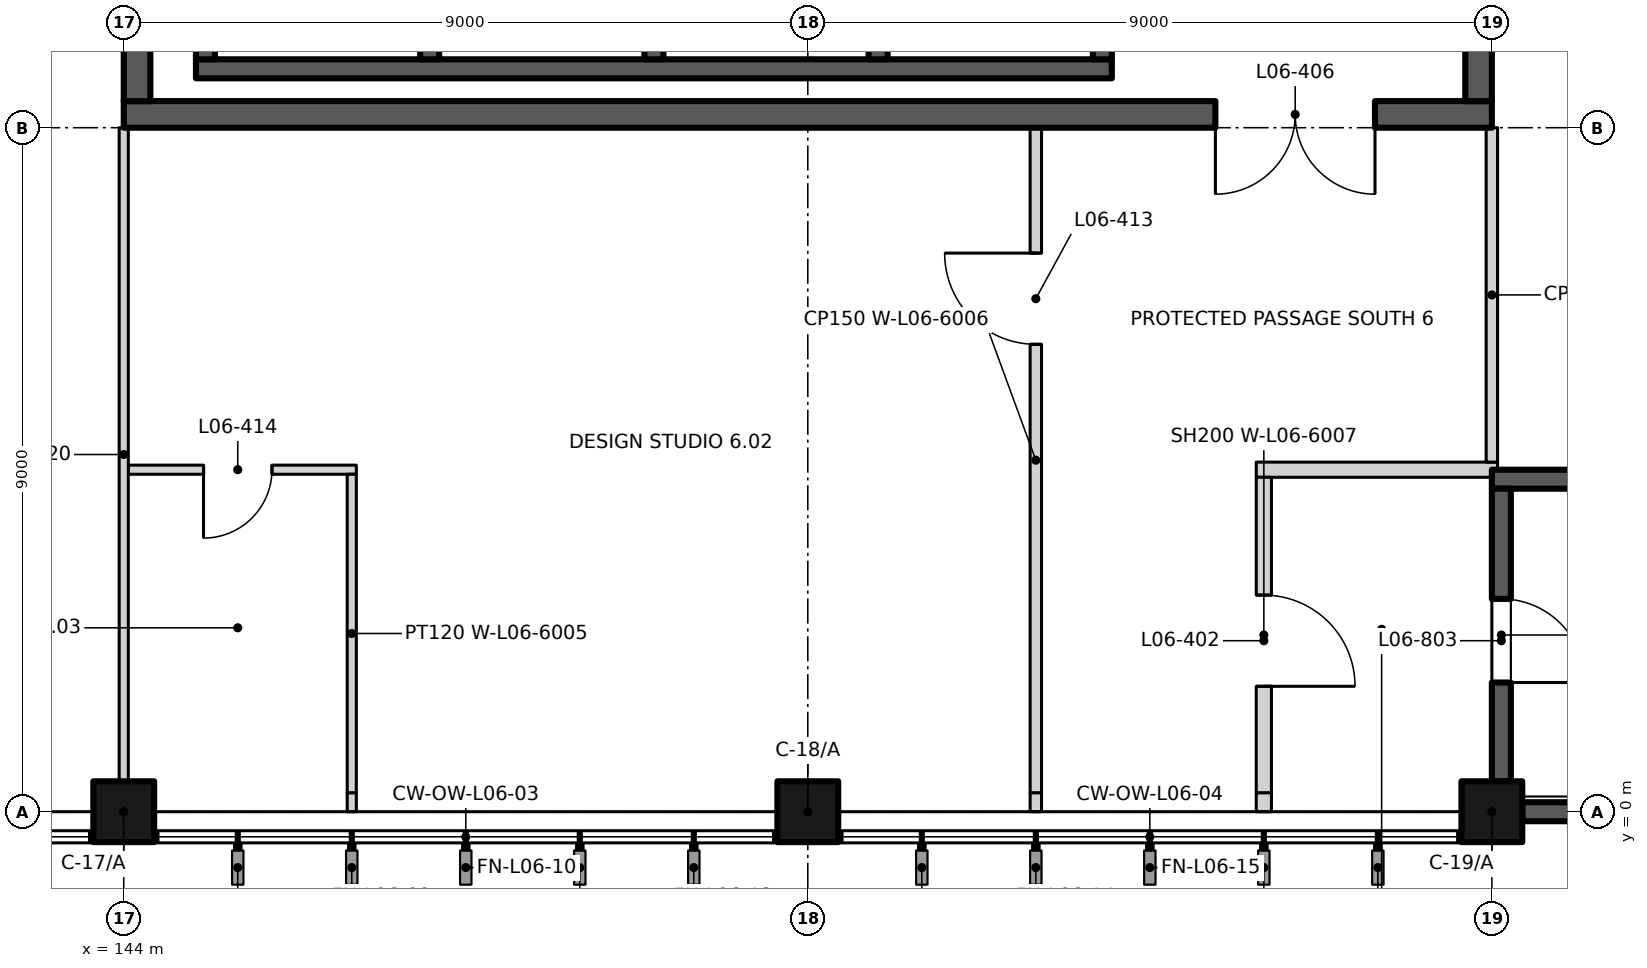
"""IFC4 building model, lengths in metres.
Left out: names, types, materials, properties, quantities, classifications, styles, units other than length and angle.
Written with IfcOpenShell. Run it as: python <this file> out.ifc"""

import sys

from ifc_helpers import new_model, si_unit, direction, frame, frame_2d, origin, origin_2d, place, context, subcontext, project, spatial, rectangle, extrude, element, fill, save


model = new_model("IFC4")
c1 = context("Model", 3, precision=1e-05, world=origin(), true_north=direction((0.0, 1.0)))
c2 = subcontext(c1, "Body", "Model", "MODEL_VIEW")
j1 = project(units=[si_unit("LENGTHUNIT", "METRE"), si_unit("PLANEANGLEUNIT", "RADIAN")], contexts=[c1])
p1 = place(None, origin())
s1 = spatial("IfcSite", under=j1, at=p1, CompositionType="ELEMENT")
p2 = place(p1, origin())
s2 = spatial("IfcBuilding", under=s1, at=p2, CompositionType="ELEMENT")
p3 = place(p2, frame((0.0, 0.0, 28.5)))
s3 = spatial("IfcBuildingStorey", under=s2, at=p3, CompositionType="ELEMENT", Elevation=28.5)
for number, where, z_axis, x_axis in (
    (1, (144.0, 0.0, 0.0), (0.0, 0.0, 1.0), (1.0, 0.0, 0.0)),
    (2, (153.0, 0.0, 0.0), (0.0, 0.0, 1.0), (1.0, 0.0, 0.0)),
    (3, (162.0, 0.0, 0.0), (0.0, 0.0, 1.0), (1.0, 0.0, 0.0)),
):
    element("IfcColumn", number, at=place(p3, frame(where, z_axis=z_axis, x_axis=x_axis)), inside=s3, PredefinedType="COLUMN", context=c2, shape_type="SweptSolid", body=[
        extrude(rectangle(XDim=0.8, YDim=0.8, at=origin_2d()), origin(), (0.0, 0.0, 1.0), 4.5),
    ])
p4 = place(p3, frame((162.4, 0.0, 0.0), z_axis=(0.0, 0.0, 1.0), x_axis=(1.0, 0.0, 0.0)))
e4 = element("IfcWall", 4, at=p4, inside=s3, PredefinedType="SHEAR", context=c2, shape_type="SweptSolid", body=[
    extrude(rectangle(XDim=8.2, YDim=0.25, at=frame_2d((4.1, 0.0))), origin(), (0.0, 0.0, 1.0), 4.5),
])
p5 = place(p3, frame((162.0, 4.375, 0.0), z_axis=(0.0, 0.0, 1.0), x_axis=(1.0, 0.0, 0.0)))
e5 = element("IfcWall", 5, at=p5, inside=s3, PredefinedType="SHEAR", context=c2, shape_type="SweptSolid", body=[
    extrude(rectangle(XDim=9.0, YDim=0.25, at=frame_2d((4.5, 0.0))), origin(), (0.0, 0.0, 1.0), 4.5),
])
p6 = place(p3, frame((162.125, 0.4, 0.0), z_axis=(0.0, 0.0, 1.0), x_axis=(0.0, 1.0, 0.0)))
e6 = element("IfcWall", 6, at=p6, inside=s3, PredefinedType="SHEAR", context=c2, shape_type="SweptSolid", body=[
    extrude(rectangle(XDim=3.85, YDim=0.25, at=frame_2d((1.925, 0.0))), origin(), (0.0, 0.0, 1.0), 4.5),
])
p7 = place(p6, frame((2.4, 0.0, 0.0), z_axis=(0.0, 0.0, 1.0), x_axis=(-1.0, 0.0, 0.0)))
e7 = element("IfcOpeningElement", 7, at=p7, cuts=e6, PredefinedType="OPENING", context=c2, shape_type="SweptSolid", body=[
    extrude(rectangle(XDim=1.1, YDim=2.1, at=frame_2d((0.55, 1.05))), frame((0.0, 0.135, 0.0), z_axis=(0.0, -1.0, 0.0), x_axis=(1.0, 0.0, 0.0)), (0.0, 0.0, 1.0), 0.27),
])
p8 = place(p3, frame((144.95, 9.775, 0.0), z_axis=(0.0, 0.0, 1.0), x_axis=(1.0, 0.0, 0.0)))
e8 = element("IfcWall", 8, at=p8, inside=s3, PredefinedType="SHEAR", context=c2, shape_type="SweptSolid", body=[
    extrude(rectangle(XDim=12.05, YDim=0.25, at=frame_2d((6.025, 0.0))), origin(), (0.0, 0.0, 1.0), 4.5),
])
for number, where, z_axis, x_axis in (
    (9, (145.075, 9.9, 0.0), (0.0, 0.0, 1.0), (0.0, 1.0, 0.0)),
    (10, (148.025, 9.9, 0.0), (0.0, 0.0, 1.0), (0.0, 1.0, 0.0)),
    (11, (150.975, 9.9, 0.0), (0.0, 0.0, 1.0), (0.0, 1.0, 0.0)),
    (12, (153.925, 9.9, 0.0), (0.0, 0.0, 1.0), (0.0, 1.0, 0.0)),
    (13, (156.875, 9.9, 0.0), (0.0, 0.0, 1.0), (0.0, 1.0, 0.0)),
):
    element("IfcWall", number, at=place(p3, frame(where, z_axis=z_axis, x_axis=x_axis)), inside=s3, PredefinedType="SHEAR", context=c2, shape_type="SweptSolid", body=[
        extrude(rectangle(XDim=2.7, YDim=0.25, at=frame_2d((1.35, 0.0))), origin(), (0.0, 0.0, 1.0), 4.5),
    ])
p9 = place(p3, frame((144.06, 4.5, 0.0), z_axis=(0.0, 0.0, 1.0), x_axis=(1.0, 0.0, 0.0)))
e14 = element("IfcWall", 14, at=p9, inside=s3, PredefinedType="PARTITIONING", context=c2, shape_type="SweptSolid", body=[
    extrude(rectangle(XDim=3.0, YDim=0.12, at=frame_2d((1.5, 0.0))), origin(), (0.0, 0.0, 1.0), 4.2),
])
p10 = place(p9, frame((1.89, 0.0, 0.0), z_axis=(0.0, 0.0, 1.0), x_axis=(-1.0, 0.0, 0.0)))
e15 = element("IfcOpeningElement", 15, at=p10, cuts=e14, PredefinedType="OPENING", context=c2, shape_type="SweptSolid", body=[
    extrude(rectangle(XDim=0.9, YDim=2.1, at=frame_2d((0.45, 1.05))), frame((0.0, 0.07, 0.0), z_axis=(0.0, -1.0, 0.0), x_axis=(1.0, 0.0, 0.0)), (0.0, 0.0, 1.0), 0.14),
])
p11 = place(p3, frame((158.9, 4.5, 0.0), z_axis=(0.0, 0.0, 1.0), x_axis=(1.0, 0.0, 0.0)))
e16 = element("IfcWall", 16, at=p11, inside=s3, PredefinedType="PARTITIONING", context=c2, shape_type="SweptSolid", body=[
    extrude(rectangle(XDim=3.175, YDim=0.2, at=frame_2d((1.587, 0.0))), origin(), (0.0, 0.0, 1.0), 4.2),
])
p12 = place(p3, frame((144.0, 9.175, 0.0), z_axis=(0.0, 0.0, 1.0), x_axis=(1.0, 0.0, 0.0)))
e17 = element("IfcWall", 17, at=p12, inside=s3, PredefinedType="SHEAR", context=c2, shape_type="SweptSolid", body=[
    extrude(rectangle(XDim=18.0, YDim=0.35, at=frame_2d((9.0, 0.0))), origin(), (0.0, 0.0, 1.0), 4.2),
])
p13 = place(p12, frame((16.463, 0.0, 0.0), z_axis=(0.0, 0.0, 1.0), x_axis=(-1.0, 0.0, 0.0)))
e18 = element("IfcOpeningElement", 18, at=p13, cuts=e17, PredefinedType="OPENING", context=c2, shape_type="SweptSolid", body=[
    extrude(rectangle(XDim=2.1, YDim=2.4, at=frame_2d((1.05, 1.2))), frame((0.0, 0.185, 0.0), z_axis=(0.0, -1.0, 0.0), x_axis=(1.0, 0.0, 0.0)), (0.0, 0.0, 1.0), 0.37),
])
p14 = place(p3, frame((144.0, 0.4, 0.0), z_axis=(0.0, 0.0, 1.0), x_axis=(0.0, 1.0, 0.0)))
e19 = element("IfcWall", 19, at=p14, inside=s3, PredefinedType="PARTITIONING", context=c2, shape_type="SweptSolid", body=[
    extrude(rectangle(XDim=8.6, YDim=0.12, at=frame_2d((4.3, 0.0))), origin(), (0.0, 0.0, 1.0), 4.2),
])
p15 = place(p3, frame((144.175, 9.35, 0.0), z_axis=(0.0, 0.0, 1.0), x_axis=(0.0, 1.0, 0.0)))
e20 = element("IfcWall", 20, at=p15, inside=s3, PredefinedType="SHEAR", context=c2, shape_type="SweptSolid", body=[
    extrude(rectangle(XDim=17.4, YDim=0.35, at=frame_2d((8.7, 0.0))), origin(), (0.0, 0.0, 1.0), 4.2),
])
p16 = place(p15, frame((3.75, 0.0, 0.0)))
e21 = element("IfcOpeningElement", 21, at=p16, cuts=e20, PredefinedType="OPENING", context=c2, shape_type="SweptSolid", body=[
    extrude(rectangle(XDim=1.6, YDim=2.4, at=frame_2d((0.8, 1.2))), frame((0.0, 0.185, 0.0), z_axis=(0.0, -1.0, 0.0), x_axis=(1.0, 0.0, 0.0)), (0.0, 0.0, 1.0), 0.37),
])
p17 = place(p3, frame((147.0, 0.0, 0.0), z_axis=(0.0, 0.0, 1.0), x_axis=(0.0, 1.0, 0.0)))
e22 = element("IfcWall", 22, at=p17, inside=s3, PredefinedType="PARTITIONING", context=c2, shape_type="SweptSolid", body=[
    extrude(rectangle(XDim=0.25, YDim=0.12, at=frame_2d((0.125, 0.0))), origin(), (0.0, 0.0, 1.0), 3.6),
])
p18 = place(p3, frame((147.0, 0.25, 0.0), z_axis=(0.0, 0.0, 1.0), x_axis=(0.0, 1.0, 0.0)))
e23 = element("IfcWall", 23, at=p18, inside=s3, PredefinedType="PARTITIONING", context=c2, shape_type="SweptSolid", body=[
    extrude(rectangle(XDim=4.19, YDim=0.12, at=frame_2d((2.095, 0.0))), origin(), (0.0, 0.0, 1.0), 4.2),
])
p19 = place(p3, frame((156.0, 0.0, 0.0), z_axis=(0.0, 0.0, 1.0), x_axis=(0.0, 1.0, 0.0)))
e24 = element("IfcWall", 24, at=p19, inside=s3, PredefinedType="PARTITIONING", context=c2, shape_type="SweptSolid", body=[
    extrude(rectangle(XDim=0.25, YDim=0.15, at=frame_2d((0.125, 0.0))), origin(), (0.0, 0.0, 1.0), 3.6),
])
p20 = place(p3, frame((156.0, 0.25, 0.0), z_axis=(0.0, 0.0, 1.0), x_axis=(0.0, 1.0, 0.0)))
e25 = element("IfcWall", 25, at=p20, inside=s3, PredefinedType="PARTITIONING", context=c2, shape_type="SweptSolid", body=[
    extrude(rectangle(XDim=8.75, YDim=0.15, at=frame_2d((4.375, 0.0))), origin(), (0.0, 0.0, 1.0), 4.2),
])
p21 = place(p20, frame((5.9, 0.0, 0.0)))
e26 = element("IfcOpeningElement", 26, at=p21, cuts=e25, PredefinedType="OPENING", context=c2, shape_type="SweptSolid", body=[
    extrude(rectangle(XDim=1.2, YDim=2.1, at=frame_2d((0.6, 1.05))), frame((0.0, 0.085, 0.0), z_axis=(0.0, -1.0, 0.0), x_axis=(1.0, 0.0, 0.0)), (0.0, 0.0, 1.0), 0.17),
])
p22 = place(p3, frame((159.0, 0.0, 0.0), z_axis=(0.0, 0.0, 1.0), x_axis=(0.0, 1.0, 0.0)))
e27 = element("IfcWall", 27, at=p22, inside=s3, PredefinedType="PARTITIONING", context=c2, shape_type="SweptSolid", body=[
    extrude(rectangle(XDim=0.25, YDim=0.2, at=frame_2d((0.125, 0.0))), origin(), (0.0, 0.0, 1.0), 3.6),
])
p23 = place(p3, frame((159.0, 0.25, 0.0), z_axis=(0.0, 0.0, 1.0), x_axis=(0.0, 1.0, 0.0)))
e28 = element("IfcWall", 28, at=p23, inside=s3, PredefinedType="PARTITIONING", context=c2, shape_type="SweptSolid", body=[
    extrude(rectangle(XDim=4.15, YDim=0.2, at=frame_2d((2.075, 0.0))), origin(), (0.0, 0.0, 1.0), 4.2),
])
p24 = place(p23, frame((2.6, 0.0, 0.0), z_axis=(0.0, 0.0, 1.0), x_axis=(-1.0, 0.0, 0.0)))
e29 = element("IfcOpeningElement", 29, at=p24, cuts=e28, PredefinedType="OPENING", context=c2, shape_type="SweptSolid", body=[
    extrude(rectangle(XDim=1.2, YDim=2.1, at=frame_2d((0.6, 1.05))), frame((0.0, 0.11, 0.0), z_axis=(0.0, -1.0, 0.0), x_axis=(1.0, 0.0, 0.0)), (0.0, 0.0, 1.0), 0.22),
])
p25 = place(p3, frame((161.825, 9.35, 0.0), z_axis=(0.0, 0.0, 1.0), x_axis=(0.0, 1.0, 0.0)))
e30 = element("IfcWall", 30, at=p25, inside=s3, PredefinedType="SHEAR", context=c2, shape_type="SweptSolid", body=[
    extrude(rectangle(XDim=17.4, YDim=0.35, at=frame_2d((8.7, 0.0))), origin(), (0.0, 0.0, 1.0), 4.2),
])
p26 = place(p25, frame((7.3, 0.0, 0.0), z_axis=(0.0, 0.0, 1.0), x_axis=(-1.0, 0.0, 0.0)))
e31 = element("IfcOpeningElement", 31, at=p26, cuts=e30, PredefinedType="OPENING", context=c2, shape_type="SweptSolid", body=[
    extrude(rectangle(XDim=1.8, YDim=2.4, at=frame_2d((0.9, 1.2))), frame((0.0, 0.185, 0.0), z_axis=(0.0, -1.0, 0.0), x_axis=(1.0, 0.0, 0.0)), (0.0, 0.0, 1.0), 0.37),
])
p27 = place(p3, frame((162.0, 4.6, 0.0), z_axis=(0.0, 0.0, 1.0), x_axis=(0.0, 1.0, 0.0)))
e32 = element("IfcWall", 32, at=p27, inside=s3, PredefinedType="PARTITIONING", context=c2, shape_type="SweptSolid", body=[
    extrude(rectangle(XDim=4.4, YDim=0.15, at=frame_2d((2.2, 0.0))), origin(), (0.0, 0.0, 1.0), 4.2),
])
p28 = place(p7, origin())
e33 = element("IfcDoor", 33, at=p28, inside=s3, OperationType="SINGLE_SWING_RIGHT", PredefinedType="DOOR", context=c2, shape_type="SweptSolid", body=[
    extrude(rectangle(XDim=1.1, YDim=2.1, at=frame_2d((0.55, 1.05))), frame((0.0, 0.025, 0.0), z_axis=(0.0, -1.0, 0.0), x_axis=(1.0, 0.0, 0.0)), (0.0, 0.0, 1.0), 0.05),
])
fill(e7, e33)
p29 = place(p24, origin())
e34 = element("IfcDoor", 34, at=p29, inside=s3, OperationType="SINGLE_SWING_RIGHT", PredefinedType="DOOR", context=c2, shape_type="SweptSolid", body=[
    extrude(rectangle(XDim=1.2, YDim=2.1, at=frame_2d((0.6, 1.05))), frame((0.0, 0.025, 0.0), z_axis=(0.0, -1.0, 0.0), x_axis=(1.0, 0.0, 0.0)), (0.0, 0.0, 1.0), 0.05),
])
fill(e29, e34)
p30 = place(p13, origin())
e35 = element("IfcDoor", 35, at=p30, inside=s3, OperationType="DOUBLE_DOOR_SINGLE_SWING", PredefinedType="DOOR", context=c2, shape_type="SweptSolid", body=[
    extrude(rectangle(XDim=2.1, YDim=2.4, at=frame_2d((1.05, 1.2))), frame((0.0, 0.025, 0.0), z_axis=(0.0, -1.0, 0.0), x_axis=(1.0, 0.0, 0.0)), (0.0, 0.0, 1.0), 0.05),
])
fill(e18, e35)
p31 = place(p21, origin())
e36 = element("IfcDoor", 36, at=p31, inside=s3, OperationType="SINGLE_SWING_RIGHT", PredefinedType="DOOR", context=c2, shape_type="SweptSolid", body=[
    extrude(rectangle(XDim=1.2, YDim=2.1, at=frame_2d((0.6, 1.05))), frame((0.0, 0.025, 0.0), z_axis=(0.0, -1.0, 0.0), x_axis=(1.0, 0.0, 0.0)), (0.0, 0.0, 1.0), 0.05),
])
fill(e26, e36)
p32 = place(p10, origin())
e37 = element("IfcDoor", 37, at=p32, inside=s3, OperationType="SINGLE_SWING_RIGHT", PredefinedType="DOOR", context=c2, shape_type="SweptSolid", body=[
    extrude(rectangle(XDim=0.9, YDim=2.1, at=frame_2d((0.45, 1.05))), frame((0.0, 0.025, 0.0), z_axis=(0.0, -1.0, 0.0), x_axis=(1.0, 0.0, 0.0)), (0.0, 0.0, 1.0), 0.05),
])
fill(e15, e37)
save(model, sys.argv[1])
